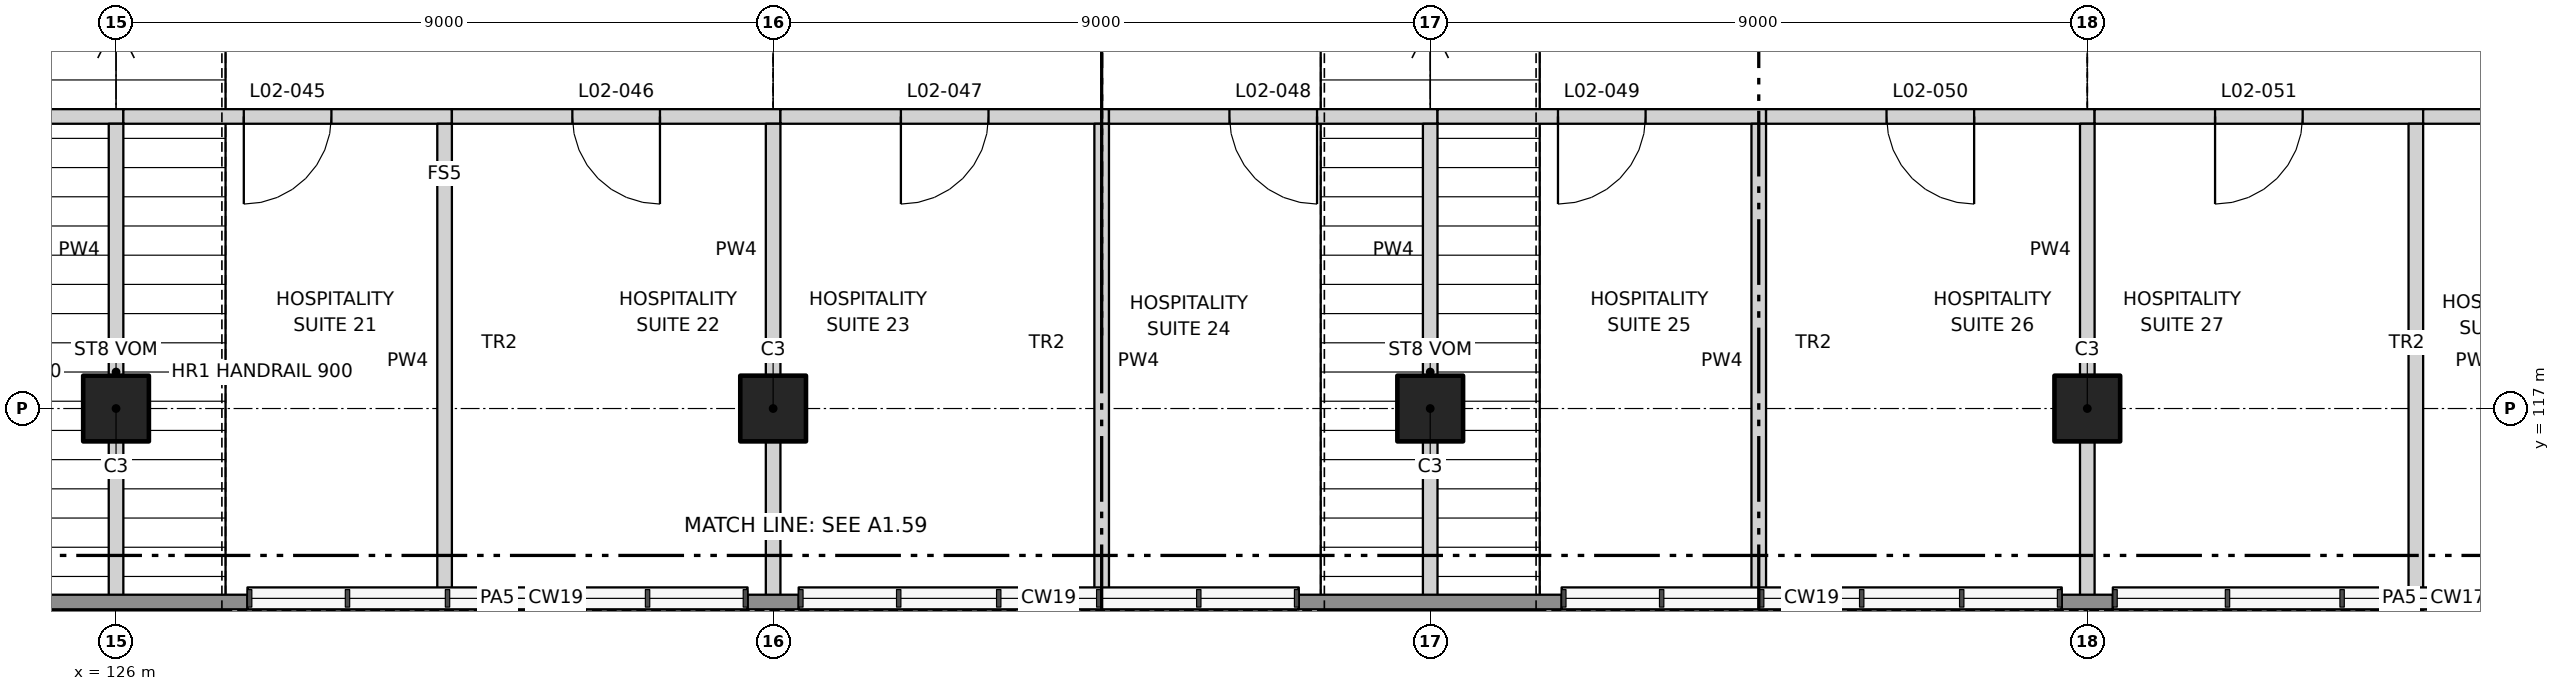
"""IFC4 building model, lengths in metres.
Left out: names, types, materials, properties, quantities, classifications, styles, units other than length and angle.
Written with IfcOpenShell. Run it as: python <this file> out.ifc"""

import sys

from ifc_helpers import new_model, si_unit, direction, frame, frame_2d, origin, origin_2d, place, context, subcontext, project, spatial, polyline, rectangle, outline, extrude, element, fill, save


model = new_model("IFC4")
c1 = context("Model", 3, precision=1e-05, world=origin(), true_north=direction((0.0, 1.0)))
c2 = subcontext(c1, "Body", "Model", "MODEL_VIEW")
j1 = project(units=[si_unit("LENGTHUNIT", "METRE"), si_unit("PLANEANGLEUNIT", "RADIAN")], contexts=[c1])
p1 = place(None, origin())
s1 = spatial("IfcSite", under=j1, at=p1, CompositionType="ELEMENT")
p2 = place(p1, origin())
s2 = spatial("IfcBuilding", under=s1, at=p2, CompositionType="ELEMENT")
p3 = place(p2, frame((0.0, 0.0, 11.5)))
s3 = spatial("IfcBuildingStorey", under=s2, at=p3, CompositionType="ELEMENT", Elevation=11.5)
for number, where, z_axis, x_axis in (
    (1, (126.0, 117.0, 0.0), (0.0, 0.0, 1.0), (1.0, 0.0, 0.0)),
    (2, (135.0, 117.0, 0.0), (0.0, 0.0, 1.0), (1.0, 0.0, 0.0)),
    (3, (144.0, 117.0, 0.0), (0.0, 0.0, 1.0), (1.0, 0.0, 0.0)),
    (4, (153.0, 117.0, 0.0), (0.0, 0.0, 1.0), (1.0, 0.0, 0.0)),
):
    element("IfcColumn", number, at=place(p3, frame(where, z_axis=z_axis, x_axis=x_axis)), inside=s3, PredefinedType="COLUMN", context=c2, shape_type="SweptSolid", body=[
        extrude(rectangle(XDim=0.9, YDim=0.9, at=origin_2d()), origin(), (0.0, 0.0, 1.0), 4.506),
    ])
p4 = place(p3, frame((121.6, 121.0, 0.0), z_axis=(0.0, 0.0, 1.0), x_axis=(1.0, 0.0, 0.0)))
e5 = element("IfcWall", 5, at=p4, inside=s3, PredefinedType="PARTITIONING", context=c2, shape_type="SweptSolid", body=[
    extrude(rectangle(XDim=4.5, YDim=0.2, at=frame_2d((2.25, 0.0))), origin(), (0.0, 0.0, 1.0), 8.258),
])
p5 = place(p4, frame((1.65, 0.0, 0.0)))
e6 = element("IfcOpeningElement", 6, at=p5, cuts=e5, PredefinedType="OPENING", context=c2, shape_type="SweptSolid", body=[
    extrude(rectangle(XDim=1.2, YDim=2.1, at=frame_2d((0.6, 1.05))), frame((0.0, 0.11, 0.0), z_axis=(0.0, -1.0, 0.0), x_axis=(1.0, 0.0, 0.0)), (0.0, 0.0, 1.0), 0.22),
])
p6 = place(p3, frame((126.1, 121.0, 0.0), z_axis=(0.0, 0.0, 1.0), x_axis=(1.0, 0.0, 0.0)))
e7 = element("IfcWall", 7, at=p6, inside=s3, PredefinedType="PARTITIONING", context=c2, shape_type="SweptSolid", body=[
    extrude(rectangle(XDim=4.5, YDim=0.2, at=frame_2d((2.25, 0.0))), origin(), (0.0, 0.0, 1.0), 8.258),
])
p7 = place(p6, frame((1.65, 0.0, 0.0)))
e8 = element("IfcOpeningElement", 8, at=p7, cuts=e7, PredefinedType="OPENING", context=c2, shape_type="SweptSolid", body=[
    extrude(rectangle(XDim=1.2, YDim=2.1, at=frame_2d((0.6, 1.05))), frame((0.0, 0.11, 0.0), z_axis=(0.0, -1.0, 0.0), x_axis=(1.0, 0.0, 0.0)), (0.0, 0.0, 1.0), 0.22),
])
p8 = place(p3, frame((130.6, 121.0, 0.0), z_axis=(0.0, 0.0, 1.0), x_axis=(1.0, 0.0, 0.0)))
e9 = element("IfcWall", 9, at=p8, inside=s3, PredefinedType="PARTITIONING", context=c2, shape_type="SweptSolid", body=[
    extrude(rectangle(XDim=4.5, YDim=0.2, at=frame_2d((2.25, 0.0))), origin(), (0.0, 0.0, 1.0), 8.258),
])
p9 = place(p8, frame((1.65, 0.0, 0.0)))
e10 = element("IfcOpeningElement", 10, at=p9, cuts=e9, PredefinedType="OPENING", context=c2, shape_type="SweptSolid", body=[
    extrude(rectangle(XDim=1.2, YDim=2.1, at=frame_2d((0.6, 1.05))), frame((0.0, 0.11, 0.0), z_axis=(0.0, -1.0, 0.0), x_axis=(1.0, 0.0, 0.0)), (0.0, 0.0, 1.0), 0.22),
])
p10 = place(p3, frame((135.1, 121.0, 0.0), z_axis=(0.0, 0.0, 1.0), x_axis=(1.0, 0.0, 0.0)))
e11 = element("IfcWall", 11, at=p10, inside=s3, PredefinedType="PARTITIONING", context=c2, shape_type="SweptSolid", body=[
    extrude(rectangle(XDim=4.5, YDim=0.2, at=frame_2d((2.25, 0.0))), origin(), (0.0, 0.0, 1.0), 8.258),
])
p11 = place(p10, frame((1.65, 0.0, 0.0)))
e12 = element("IfcOpeningElement", 12, at=p11, cuts=e11, PredefinedType="OPENING", context=c2, shape_type="SweptSolid", body=[
    extrude(rectangle(XDim=1.2, YDim=2.1, at=frame_2d((0.6, 1.05))), frame((0.0, 0.11, 0.0), z_axis=(0.0, -1.0, 0.0), x_axis=(1.0, 0.0, 0.0)), (0.0, 0.0, 1.0), 0.22),
])
p12 = place(p3, frame((139.6, 121.0, 0.0), z_axis=(0.0, 0.0, 1.0), x_axis=(1.0, 0.0, 0.0)))
e13 = element("IfcWall", 13, at=p12, inside=s3, PredefinedType="PARTITIONING", context=c2, shape_type="SweptSolid", body=[
    extrude(rectangle(XDim=4.5, YDim=0.2, at=frame_2d((2.25, 0.0))), origin(), (0.0, 0.0, 1.0), 8.258),
])
p13 = place(p12, frame((1.65, 0.0, 0.0)))
e14 = element("IfcOpeningElement", 14, at=p13, cuts=e13, PredefinedType="OPENING", context=c2, shape_type="SweptSolid", body=[
    extrude(rectangle(XDim=1.2, YDim=2.1, at=frame_2d((0.6, 1.05))), frame((0.0, 0.11, 0.0), z_axis=(0.0, -1.0, 0.0), x_axis=(1.0, 0.0, 0.0)), (0.0, 0.0, 1.0), 0.22),
])
p14 = place(p3, frame((144.1, 121.0, 0.0), z_axis=(0.0, 0.0, 1.0), x_axis=(1.0, 0.0, 0.0)))
e15 = element("IfcWall", 15, at=p14, inside=s3, PredefinedType="PARTITIONING", context=c2, shape_type="SweptSolid", body=[
    extrude(rectangle(XDim=4.5, YDim=0.2, at=frame_2d((2.25, 0.0))), origin(), (0.0, 0.0, 1.0), 8.258),
])
p15 = place(p14, frame((1.65, 0.0, 0.0)))
e16 = element("IfcOpeningElement", 16, at=p15, cuts=e15, PredefinedType="OPENING", context=c2, shape_type="SweptSolid", body=[
    extrude(rectangle(XDim=1.2, YDim=2.1, at=frame_2d((0.6, 1.05))), frame((0.0, 0.11, 0.0), z_axis=(0.0, -1.0, 0.0), x_axis=(1.0, 0.0, 0.0)), (0.0, 0.0, 1.0), 0.22),
])
p16 = place(p3, frame((148.6, 121.0, 0.0), z_axis=(0.0, 0.0, 1.0), x_axis=(1.0, 0.0, 0.0)))
e17 = element("IfcWall", 17, at=p16, inside=s3, PredefinedType="PARTITIONING", context=c2, shape_type="SweptSolid", body=[
    extrude(rectangle(XDim=4.5, YDim=0.2, at=frame_2d((2.25, 0.0))), origin(), (0.0, 0.0, 1.0), 8.258),
])
p17 = place(p16, frame((1.65, 0.0, 0.0)))
e18 = element("IfcOpeningElement", 18, at=p17, cuts=e17, PredefinedType="OPENING", context=c2, shape_type="SweptSolid", body=[
    extrude(rectangle(XDim=1.2, YDim=2.1, at=frame_2d((0.6, 1.05))), frame((0.0, 0.11, 0.0), z_axis=(0.0, -1.0, 0.0), x_axis=(1.0, 0.0, 0.0)), (0.0, 0.0, 1.0), 0.22),
])
p18 = place(p3, frame((153.1, 121.0, 0.0), z_axis=(0.0, 0.0, 1.0), x_axis=(1.0, 0.0, 0.0)))
e19 = element("IfcWall", 19, at=p18, inside=s3, PredefinedType="PARTITIONING", context=c2, shape_type="SweptSolid", body=[
    extrude(rectangle(XDim=4.5, YDim=0.2, at=frame_2d((2.25, 0.0))), origin(), (0.0, 0.0, 1.0), 8.258),
])
p19 = place(p18, frame((1.65, 0.0, 0.0)))
e20 = element("IfcOpeningElement", 20, at=p19, cuts=e19, PredefinedType="OPENING", context=c2, shape_type="SweptSolid", body=[
    extrude(rectangle(XDim=1.2, YDim=2.1, at=frame_2d((0.6, 1.05))), frame((0.0, 0.11, 0.0), z_axis=(0.0, -1.0, 0.0), x_axis=(1.0, 0.0, 0.0)), (0.0, 0.0, 1.0), 0.22),
])
p20 = place(p3, frame((157.6, 121.0, 0.0), z_axis=(0.0, 0.0, 1.0), x_axis=(1.0, 0.0, 0.0)))
e21 = element("IfcWall", 21, at=p20, inside=s3, PredefinedType="PARTITIONING", context=c2, shape_type="SweptSolid", body=[
    extrude(outline(polyline([(0.0, 0.0), (4.5, 0.0), (4.5, 10.5), (4.0, 8.258), (0.0, 8.258), (0.0, 0.0)])), frame((0.0, 0.1, 0.0), z_axis=(0.0, -1.0, 0.0), x_axis=(1.0, 0.0, 0.0)), (0.0, 0.0, 1.0), 0.2),
])
p21 = place(p20, frame((1.65, 0.0, 0.0)))
e22 = element("IfcOpeningElement", 22, at=p21, cuts=e21, PredefinedType="OPENING", context=c2, shape_type="SweptSolid", body=[
    extrude(rectangle(XDim=1.2, YDim=2.1, at=frame_2d((0.6, 1.05))), frame((0.0, 0.11, 0.0), z_axis=(0.0, -1.0, 0.0), x_axis=(1.0, 0.0, 0.0)), (0.0, 0.0, 1.0), 0.22),
])
p22 = place(p3, frame((126.0, 114.4, 0.0), z_axis=(0.0, 0.0, 1.0), x_axis=(0.0, 1.0, 0.0)))
e23 = element("IfcWall", 23, at=p22, inside=s3, PredefinedType="PARTITIONING", context=c2, shape_type="SweptSolid", body=[
    extrude(rectangle(XDim=2.15, YDim=0.2, at=frame_2d((1.075, 0.0))), origin(), (0.0, 0.0, 1.0), 1.939),
])
p23 = place(p3, frame((126.0, 117.45, 0.0), z_axis=(0.0, 0.0, 1.0), x_axis=(0.0, 1.0, 0.0)))
e24 = element("IfcWall", 24, at=p23, inside=s3, PredefinedType="PARTITIONING", context=c2, shape_type="SweptSolid", body=[
    extrude(rectangle(XDim=3.45, YDim=0.2, at=frame_2d((1.725, 0.0))), origin(), (0.0, 0.0, 1.0), 4.439),
])
p24 = place(p3, frame((130.5, 114.4, 0.0), z_axis=(0.0, 0.0, 1.0), x_axis=(0.0, 1.0, 0.0)))
e25 = element("IfcWall", 25, at=p24, inside=s3, PredefinedType="PARTITIONING", context=c2, shape_type="SweptSolid", body=[
    extrude(outline(polyline([(0.0, 0.0), (6.5, 0.0), (6.5, 8.195), (0.0, 4.133), (0.0, 0.0)])), frame((0.0, 0.1, 0.0), z_axis=(0.0, -1.0, 0.0), x_axis=(1.0, 0.0, 0.0)), (0.0, 0.0, 1.0), 0.2),
])
p25 = place(p3, frame((135.0, 114.4, 0.0), z_axis=(0.0, 0.0, 1.0), x_axis=(0.0, 1.0, 0.0)))
e26 = element("IfcWall", 26, at=p25, inside=s3, PredefinedType="PARTITIONING", context=c2, shape_type="SweptSolid", body=[
    extrude(outline(polyline([(0.0, 0.0), (2.15, 0.0), (2.15, 2.877), (0.071, 2.877), (0.0, 2.833), (0.0, 0.0)])), frame((0.0, 0.1, 0.0), z_axis=(0.0, -1.0, 0.0), x_axis=(1.0, 0.0, 0.0)), (0.0, 0.0, 1.0), 0.2),
])
p26 = place(p3, frame((135.0, 117.45, 0.0), z_axis=(0.0, 0.0, 1.0), x_axis=(0.0, 1.0, 0.0)))
e27 = element("IfcWall", 27, at=p26, inside=s3, PredefinedType="PARTITIONING", context=c2, shape_type="SweptSolid", body=[
    extrude(rectangle(XDim=3.45, YDim=0.2, at=frame_2d((1.725, 0.0))), origin(), (0.0, 0.0, 1.0), 4.439),
])
p27 = place(p3, frame((139.5, 114.4, 0.0), z_axis=(0.0, 0.0, 1.0), x_axis=(0.0, 1.0, 0.0)))
e28 = element("IfcWall", 28, at=p27, inside=s3, PredefinedType="PARTITIONING", context=c2, shape_type="SweptSolid", body=[
    extrude(outline(polyline([(0.0, 0.0), (6.5, 0.0), (6.5, 8.195), (0.0, 4.133), (0.0, 0.0)])), frame((0.0, 0.1, 0.0), z_axis=(0.0, -1.0, 0.0), x_axis=(1.0, 0.0, 0.0)), (0.0, 0.0, 1.0), 0.2),
])
p28 = place(p3, frame((144.0, 114.4, 0.0), z_axis=(0.0, 0.0, 1.0), x_axis=(0.0, 1.0, 0.0)))
e29 = element("IfcWall", 29, at=p28, inside=s3, PredefinedType="PARTITIONING", context=c2, shape_type="SweptSolid", body=[
    extrude(rectangle(XDim=2.15, YDim=0.2, at=frame_2d((1.075, 0.0))), origin(), (0.0, 0.0, 1.0), 1.939),
])
p29 = place(p3, frame((144.0, 117.45, 0.0), z_axis=(0.0, 0.0, 1.0), x_axis=(0.0, 1.0, 0.0)))
e30 = element("IfcWall", 30, at=p29, inside=s3, PredefinedType="PARTITIONING", context=c2, shape_type="SweptSolid", body=[
    extrude(rectangle(XDim=3.45, YDim=0.2, at=frame_2d((1.725, 0.0))), origin(), (0.0, 0.0, 1.0), 4.439),
])
p30 = place(p3, frame((148.5, 114.4, 0.0), z_axis=(0.0, 0.0, 1.0), x_axis=(0.0, 1.0, 0.0)))
e31 = element("IfcWall", 31, at=p30, inside=s3, PredefinedType="PARTITIONING", context=c2, shape_type="SweptSolid", body=[
    extrude(outline(polyline([(0.0, 0.0), (6.5, 0.0), (6.5, 8.195), (0.0, 4.133), (0.0, 0.0)])), frame((0.0, 0.1, 0.0), z_axis=(0.0, -1.0, 0.0), x_axis=(1.0, 0.0, 0.0)), (0.0, 0.0, 1.0), 0.2),
])
p31 = place(p3, frame((153.0, 114.4, 0.0), z_axis=(0.0, 0.0, 1.0), x_axis=(0.0, 1.0, 0.0)))
e32 = element("IfcWall", 32, at=p31, inside=s3, PredefinedType="PARTITIONING", context=c2, shape_type="SweptSolid", body=[
    extrude(outline(polyline([(0.0, 0.0), (2.15, 0.0), (2.15, 2.877), (0.071, 2.877), (0.0, 2.833), (0.0, 0.0)])), frame((0.0, 0.1, 0.0), z_axis=(0.0, -1.0, 0.0), x_axis=(1.0, 0.0, 0.0)), (0.0, 0.0, 1.0), 0.2),
])
p32 = place(p3, frame((153.0, 117.45, 0.0), z_axis=(0.0, 0.0, 1.0), x_axis=(0.0, 1.0, 0.0)))
e33 = element("IfcWall", 33, at=p32, inside=s3, PredefinedType="PARTITIONING", context=c2, shape_type="SweptSolid", body=[
    extrude(rectangle(XDim=3.45, YDim=0.2, at=frame_2d((1.725, 0.0))), origin(), (0.0, 0.0, 1.0), 4.439),
])
p33 = place(p3, frame((157.5, 114.4, 0.0), z_axis=(0.0, 0.0, 1.0), x_axis=(0.0, 1.0, 0.0)))
e34 = element("IfcWall", 34, at=p33, inside=s3, PredefinedType="PARTITIONING", context=c2, shape_type="SweptSolid", body=[
    extrude(outline(polyline([(0.0, 0.0), (6.5, 0.0), (6.5, 8.195), (0.0, 4.133), (0.0, 0.0)])), frame((0.0, 0.1, 0.0), z_axis=(0.0, -1.0, 0.0), x_axis=(1.0, 0.0, 0.0)), (0.0, 0.0, 1.0), 0.2),
])
for number, where, z_axis, x_axis in (
    (35, (127.8, 114.35, 0.0), (0.0, 0.0, 1.0), (1.0, 0.0, 0.0)),
    (36, (135.35, 114.35, 0.0), (0.0, 0.0, 1.0), (1.0, 0.0, 0.0)),
    (37, (145.8, 114.35, 0.0), (0.0, 0.0, 1.0), (1.0, 0.0, 0.0)),
):
    element("IfcWall", number, at=place(p3, frame(where, z_axis=z_axis, x_axis=x_axis)), inside=s3, PredefinedType="SOLIDWALL", context=c2, shape_type="SweptSolid", body=[
        extrude(rectangle(XDim=6.85, YDim=0.2, at=frame_2d((3.425, 0.0))), origin(), (0.0, 0.0, 1.0), 1.1),
    ])
p34 = place(p3, frame((153.35, 114.35, 0.0), z_axis=(0.0, 0.0, 1.0), x_axis=(1.0, 0.0, 0.0)))
e38 = element("IfcWall", 38, at=p34, inside=s3, PredefinedType="SOLIDWALL", context=c2, shape_type="SweptSolid", body=[
    extrude(rectangle(XDim=7.85, YDim=0.2, at=frame_2d((3.925, 0.0))), origin(), (0.0, 0.0, 1.0), 1.1),
])
p35 = place(p3, frame((124.2, 114.35, 0.0), z_axis=(0.0, 0.0, 1.0), x_axis=(1.0, 0.0, 0.0)))
e39 = element("IfcWall", 39, at=p35, inside=s3, PredefinedType="SOLIDWALL", context=c2, shape_type="SweptSolid", body=[
    extrude(rectangle(XDim=3.6, YDim=0.2, at=frame_2d((1.8, 0.0))), origin(), (0.0, 0.0, 1.0), 4.034),
])
p36 = place(p3, frame((134.65, 114.35, 0.0), z_axis=(0.0, 0.0, 1.0), x_axis=(1.0, 0.0, 0.0)))
e40 = element("IfcWall", 40, at=p36, inside=s3, PredefinedType="SOLIDWALL", context=c2, shape_type="SweptSolid", body=[
    extrude(rectangle(XDim=0.7, YDim=0.2, at=frame_2d((0.35, 0.0))), origin(), (0.0, 0.0, 1.0), 4.034),
])
p37 = place(p3, frame((142.2, 114.35, 0.0), z_axis=(0.0, 0.0, 1.0), x_axis=(1.0, 0.0, 0.0)))
e41 = element("IfcWall", 41, at=p37, inside=s3, PredefinedType="SOLIDWALL", context=c2, shape_type="SweptSolid", body=[
    extrude(rectangle(XDim=3.6, YDim=0.2, at=frame_2d((1.8, 0.0))), origin(), (0.0, 0.0, 1.0), 4.034),
])
p38 = place(p3, frame((152.65, 114.35, 0.0), z_axis=(0.0, 0.0, 1.0), x_axis=(1.0, 0.0, 0.0)))
e42 = element("IfcWall", 42, at=p38, inside=s3, PredefinedType="SOLIDWALL", context=c2, shape_type="SweptSolid", body=[
    extrude(rectangle(XDim=0.7, YDim=0.2, at=frame_2d((0.35, 0.0))), origin(), (0.0, 0.0, 1.0), 4.034),
])
p39 = place(p7, frame((1.2, 0.0, 0.0), z_axis=(0.0, 0.0, 1.0), x_axis=(-1.0, 0.0, 0.0)))
e43 = element("IfcDoor", 43, at=p39, inside=s3, OperationType="SINGLE_SWING_RIGHT", PredefinedType="DOOR", context=c2, shape_type="SweptSolid", body=[
    extrude(rectangle(XDim=1.2, YDim=2.1, at=frame_2d((0.6, 1.05))), frame((0.0, 0.025, 0.0), z_axis=(0.0, -1.0, 0.0), x_axis=(1.0, 0.0, 0.0)), (0.0, 0.0, 1.0), 0.05),
])
fill(e8, e43)
p40 = place(p9, frame((1.2, 0.0, 0.0), z_axis=(0.0, 0.0, 1.0), x_axis=(-1.0, 0.0, 0.0)))
e44 = element("IfcDoor", 44, at=p40, inside=s3, OperationType="SINGLE_SWING_LEFT", PredefinedType="DOOR", context=c2, shape_type="SweptSolid", body=[
    extrude(rectangle(XDim=1.2, YDim=2.1, at=frame_2d((0.6, 1.05))), frame((0.0, 0.025, 0.0), z_axis=(0.0, -1.0, 0.0), x_axis=(1.0, 0.0, 0.0)), (0.0, 0.0, 1.0), 0.05),
])
fill(e10, e44)
p41 = place(p11, frame((1.2, 0.0, 0.0), z_axis=(0.0, 0.0, 1.0), x_axis=(-1.0, 0.0, 0.0)))
e45 = element("IfcDoor", 45, at=p41, inside=s3, OperationType="SINGLE_SWING_RIGHT", PredefinedType="DOOR", context=c2, shape_type="SweptSolid", body=[
    extrude(rectangle(XDim=1.2, YDim=2.1, at=frame_2d((0.6, 1.05))), frame((0.0, 0.025, 0.0), z_axis=(0.0, -1.0, 0.0), x_axis=(1.0, 0.0, 0.0)), (0.0, 0.0, 1.0), 0.05),
])
fill(e12, e45)
p42 = place(p13, frame((1.2, 0.0, 0.0), z_axis=(0.0, 0.0, 1.0), x_axis=(-1.0, 0.0, 0.0)))
e46 = element("IfcDoor", 46, at=p42, inside=s3, OperationType="SINGLE_SWING_LEFT", PredefinedType="DOOR", context=c2, shape_type="SweptSolid", body=[
    extrude(rectangle(XDim=1.2, YDim=2.1, at=frame_2d((0.6, 1.05))), frame((0.0, 0.025, 0.0), z_axis=(0.0, -1.0, 0.0), x_axis=(1.0, 0.0, 0.0)), (0.0, 0.0, 1.0), 0.05),
])
fill(e14, e46)
p43 = place(p15, frame((1.2, 0.0, 0.0), z_axis=(0.0, 0.0, 1.0), x_axis=(-1.0, 0.0, 0.0)))
e47 = element("IfcDoor", 47, at=p43, inside=s3, OperationType="SINGLE_SWING_RIGHT", PredefinedType="DOOR", context=c2, shape_type="SweptSolid", body=[
    extrude(rectangle(XDim=1.2, YDim=2.1, at=frame_2d((0.6, 1.05))), frame((0.0, 0.025, 0.0), z_axis=(0.0, -1.0, 0.0), x_axis=(1.0, 0.0, 0.0)), (0.0, 0.0, 1.0), 0.05),
])
fill(e16, e47)
p44 = place(p17, frame((1.2, 0.0, 0.0), z_axis=(0.0, 0.0, 1.0), x_axis=(-1.0, 0.0, 0.0)))
e48 = element("IfcDoor", 48, at=p44, inside=s3, OperationType="SINGLE_SWING_LEFT", PredefinedType="DOOR", context=c2, shape_type="SweptSolid", body=[
    extrude(rectangle(XDim=1.2, YDim=2.1, at=frame_2d((0.6, 1.05))), frame((0.0, 0.025, 0.0), z_axis=(0.0, -1.0, 0.0), x_axis=(1.0, 0.0, 0.0)), (0.0, 0.0, 1.0), 0.05),
])
fill(e18, e48)
p45 = place(p19, frame((1.2, 0.0, 0.0), z_axis=(0.0, 0.0, 1.0), x_axis=(-1.0, 0.0, 0.0)))
e49 = element("IfcDoor", 49, at=p45, inside=s3, OperationType="SINGLE_SWING_RIGHT", PredefinedType="DOOR", context=c2, shape_type="SweptSolid", body=[
    extrude(rectangle(XDim=1.2, YDim=2.1, at=frame_2d((0.6, 1.05))), frame((0.0, 0.025, 0.0), z_axis=(0.0, -1.0, 0.0), x_axis=(1.0, 0.0, 0.0)), (0.0, 0.0, 1.0), 0.05),
])
fill(e20, e49)
save(model, sys.argv[1])
